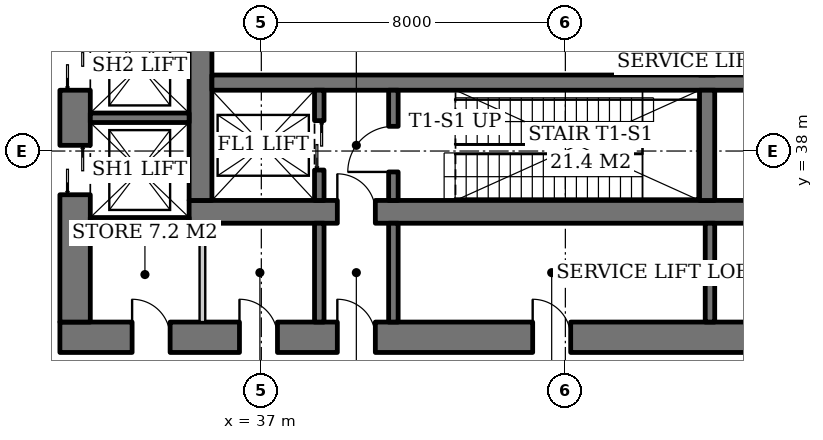
"""IFC4 building model, lengths in metres.
Left out: names, types, materials, properties, quantities, classifications, styles, units other than length and angle.
Written with IfcOpenShell. Run it as: python <this file> out.ifc"""

import sys

from ifc_helpers import new_model, si_unit, direction, frame, frame_2d, origin, place, context, subcontext, project, spatial, rectangle, extrude, element, fill, save


model = new_model("IFC4")
c1 = context("Model", 3, precision=1e-05, world=origin(), true_north=direction((0.0, 1.0)))
c2 = subcontext(c1, "Body", "Model", "MODEL_VIEW")
j1 = project(units=[si_unit("LENGTHUNIT", "METRE"), si_unit("PLANEANGLEUNIT", "RADIAN")], contexts=[c1])
p1 = place(None, origin())
s1 = spatial("IfcSite", under=j1, at=p1, CompositionType="ELEMENT")
p2 = place(p1, origin())
s2 = spatial("IfcBuilding", under=s1, at=p2, CompositionType="ELEMENT")
p3 = place(p2, origin())
s3 = spatial("IfcBuildingStorey", under=s2, at=p3, CompositionType="ELEMENT", Elevation=0.0)
p4 = place(p3, frame((35.1, 36.4, 0.0), z_axis=(0.0, 0.0, 1.0), x_axis=(1.0, 0.0, 0.0)))
e1 = element("IfcWall", 1, at=p4, inside=s3, PredefinedType="SHEAR", context=c2, shape_type="SweptSolid", body=[
    extrude(rectangle(XDim=19.8, YDim=0.6, at=frame_2d((9.9, 0.0))), origin(), (0.0, 0.0, 1.0), 6.0),
])
p5 = place(p4, frame((3.9, 0.0, 0.0)))
e2 = element("IfcOpeningElement", 2, at=p5, cuts=e1, PredefinedType="OPENING", context=c2, shape_type="SweptSolid", body=[
    extrude(rectangle(XDim=1.0, YDim=2.1, at=frame_2d((0.5, 1.05))), frame((0.0, 0.31, 0.0), z_axis=(0.0, -1.0, 0.0), x_axis=(1.0, 0.0, 0.0)), (0.0, 0.0, 1.0), 0.62),
])
p6 = place(p4, frame((15.35, 0.0, 0.0)))
e3 = element("IfcOpeningElement", 3, at=p6, cuts=e1, PredefinedType="OPENING", context=c2, shape_type="SweptSolid", body=[
    extrude(rectangle(XDim=1.0, YDim=2.1, at=frame_2d((0.5, 1.05))), frame((0.0, 0.31, 0.0), z_axis=(0.0, -1.0, 0.0), x_axis=(1.0, 0.0, 0.0)), (0.0, 0.0, 1.0), 0.62),
])
p7 = place(p3, frame((35.4, 36.7, 0.0), z_axis=(0.0, 0.0, 1.0), x_axis=(0.0, 1.0, 0.0)))
e4 = element("IfcWall", 4, at=p7, inside=s3, PredefinedType="SHEAR", context=c2, shape_type="SweptSolid", body=[
    extrude(rectangle(XDim=18.6, YDim=0.6, at=frame_2d((9.3, 0.0))), origin(), (0.0, 0.0, 1.0), 6.0),
])
p8 = place(p7, frame((8.4, 0.0, 0.0)))
e5 = element("IfcOpeningElement", 5, at=p8, cuts=e4, PredefinedType="OPENING", context=c2, shape_type="SweptSolid", body=[
    extrude(rectangle(XDim=1.8, YDim=2.4, at=frame_2d((0.9, 1.2))), frame((0.0, 0.31, 0.0), z_axis=(0.0, -1.0, 0.0), x_axis=(1.0, 0.0, 0.0)), (0.0, 0.0, 1.0), 0.62),
])
p9 = place(p3, frame((31.7, 33.1, 0.0), z_axis=(0.0, 0.0, 1.0), x_axis=(1.0, 0.0, 0.0)))
e6 = element("IfcWall", 6, at=p9, inside=s3, PredefinedType="SHEAR", context=c2, shape_type="SweptSolid", body=[
    extrude(rectangle(XDim=26.6, YDim=0.8, at=frame_2d((13.3, 0.0))), origin(), (0.0, 0.0, 1.0), 6.0),
])
p10 = place(p9, frame((7.3, 0.0, 0.0)))
e7 = element("IfcOpeningElement", 7, at=p10, cuts=e6, PredefinedType="OPENING", context=c2, shape_type="SweptSolid", body=[
    extrude(rectangle(XDim=1.0, YDim=2.1, at=frame_2d((0.5, 1.05))), frame((0.0, 0.41, 0.0), z_axis=(0.0, -1.0, 0.0), x_axis=(1.0, 0.0, 0.0)), (0.0, 0.0, 1.0), 0.82),
])
p11 = place(p9, frame((18.75, 0.0, 0.0)))
e8 = element("IfcOpeningElement", 8, at=p11, cuts=e6, PredefinedType="OPENING", context=c2, shape_type="SweptSolid", body=[
    extrude(rectangle(XDim=1.0, YDim=2.1, at=frame_2d((0.5, 1.05))), frame((0.0, 0.41, 0.0), z_axis=(0.0, -1.0, 0.0), x_axis=(1.0, 0.0, 0.0)), (0.0, 0.0, 1.0), 0.82),
])
p12 = place(p9, frame((1.9, 0.0, 0.0)))
e9 = element("IfcOpeningElement", 9, at=p12, cuts=e6, PredefinedType="OPENING", context=c2, shape_type="SweptSolid", body=[
    extrude(rectangle(XDim=1.0, YDim=2.1, at=frame_2d((0.5, 1.05))), frame((0.0, 0.41, 0.0), z_axis=(0.0, -1.0, 0.0), x_axis=(1.0, 0.0, 0.0)), (0.0, 0.0, 1.0), 0.82),
])
p13 = place(p9, frame((4.725, 0.0, 0.0)))
e10 = element("IfcOpeningElement", 10, at=p13, cuts=e6, PredefinedType="OPENING", context=c2, shape_type="SweptSolid", body=[
    extrude(rectangle(XDim=1.0, YDim=2.1, at=frame_2d((0.5, 1.05))), frame((0.0, 0.41, 0.0), z_axis=(0.0, -1.0, 0.0), x_axis=(1.0, 0.0, 0.0)), (0.0, 0.0, 1.0), 0.82),
])
p14 = place(p9, frame((12.44, 0.0, 0.0)))
e11 = element("IfcOpeningElement", 11, at=p14, cuts=e6, PredefinedType="OPENING", context=c2, shape_type="SweptSolid", body=[
    extrude(rectangle(XDim=1.0, YDim=2.1, at=frame_2d((0.5, 1.05))), frame((0.0, 0.41, 0.0), z_axis=(0.0, -1.0, 0.0), x_axis=(1.0, 0.0, 0.0)), (0.0, 0.0, 1.0), 0.82),
])
p15 = place(p9, frame((20.626, 0.0, 0.0)))
e12 = element("IfcOpeningElement", 12, at=p15, cuts=e6, PredefinedType="OPENING", context=c2, shape_type="SweptSolid", body=[
    extrude(rectangle(XDim=1.0, YDim=2.1, at=frame_2d((0.5, 1.05))), frame((0.0, 0.41, 0.0), z_axis=(0.0, -1.0, 0.0), x_axis=(1.0, 0.0, 0.0)), (0.0, 0.0, 1.0), 0.82),
])
p16 = place(p9, frame((23.476, 0.0, 0.0)))
e13 = element("IfcOpeningElement", 13, at=p16, cuts=e6, PredefinedType="OPENING", context=c2, shape_type="SweptSolid", body=[
    extrude(rectangle(XDim=1.0, YDim=2.1, at=frame_2d((0.5, 1.05))), frame((0.0, 0.41, 0.0), z_axis=(0.0, -1.0, 0.0), x_axis=(1.0, 0.0, 0.0)), (0.0, 0.0, 1.0), 0.82),
])
p17 = place(p3, frame((32.1, 33.5, 0.0), z_axis=(0.0, 0.0, 1.0), x_axis=(0.0, 1.0, 0.0)))
e14 = element("IfcWall", 14, at=p17, inside=s3, PredefinedType="SHEAR", context=c2, shape_type="SweptSolid", body=[
    extrude(rectangle(XDim=25.0, YDim=0.8, at=frame_2d((12.5, 0.0))), origin(), (0.0, 0.0, 1.0), 6.0),
])
p18 = place(p17, frame((3.35, 0.0, 0.0)))
e15 = element("IfcOpeningElement", 15, at=p18, cuts=e14, PredefinedType="OPENING", context=c2, shape_type="SweptSolid", body=[
    extrude(rectangle(XDim=1.3, YDim=2.2, at=frame_2d((0.65, 1.1))), frame((0.0, 0.41, 0.0), z_axis=(0.0, -1.0, 0.0), x_axis=(1.0, 0.0, 0.0)), (0.0, 0.0, 1.0), 0.82),
])
p19 = place(p17, frame((6.1, 0.0, 0.0)))
e16 = element("IfcOpeningElement", 16, at=p19, cuts=e14, PredefinedType="OPENING", context=c2, shape_type="SweptSolid", body=[
    extrude(rectangle(XDim=1.3, YDim=2.2, at=frame_2d((0.65, 1.1))), frame((0.0, 0.41, 0.0), z_axis=(0.0, -1.0, 0.0), x_axis=(1.0, 0.0, 0.0)), (0.0, 0.0, 1.0), 0.82),
])
p20 = place(p17, frame((8.85, 0.0, 0.0)))
e17 = element("IfcOpeningElement", 17, at=p20, cuts=e14, PredefinedType="OPENING", context=c2, shape_type="SweptSolid", body=[
    extrude(rectangle(XDim=1.3, YDim=2.2, at=frame_2d((0.65, 1.1))), frame((0.0, 0.41, 0.0), z_axis=(0.0, -1.0, 0.0), x_axis=(1.0, 0.0, 0.0)), (0.0, 0.0, 1.0), 0.82),
])
p21 = place(p17, frame((14.85, 0.0, 0.0)))
e18 = element("IfcOpeningElement", 18, at=p21, cuts=e14, PredefinedType="OPENING", context=c2, shape_type="SweptSolid", body=[
    extrude(rectangle(XDim=1.3, YDim=2.2, at=frame_2d((0.65, 1.1))), frame((0.0, 0.41, 0.0), z_axis=(0.0, -1.0, 0.0), x_axis=(1.0, 0.0, 0.0)), (0.0, 0.0, 1.0), 0.82),
])
p22 = place(p17, frame((17.6, 0.0, 0.0)))
e19 = element("IfcOpeningElement", 19, at=p22, cuts=e14, PredefinedType="OPENING", context=c2, shape_type="SweptSolid", body=[
    extrude(rectangle(XDim=1.3, YDim=2.2, at=frame_2d((0.65, 1.1))), frame((0.0, 0.41, 0.0), z_axis=(0.0, -1.0, 0.0), x_axis=(1.0, 0.0, 0.0)), (0.0, 0.0, 1.0), 0.82),
])
p23 = place(p17, frame((11.6, 0.0, 0.0)))
e20 = element("IfcOpeningElement", 20, at=p23, cuts=e14, PredefinedType="OPENING", context=c2, shape_type="SweptSolid", body=[
    extrude(rectangle(XDim=1.8, YDim=2.4, at=frame_2d((0.9, 1.2))), frame((0.0, 0.41, 0.0), z_axis=(0.0, -1.0, 0.0), x_axis=(1.0, 0.0, 0.0)), (0.0, 0.0, 1.0), 0.82),
])
p24 = place(p3, frame((35.7, 39.8, 0.0), z_axis=(0.0, 0.0, 1.0), x_axis=(1.0, 0.0, 0.0)))
e21 = element("IfcWall", 21, at=p24, inside=s3, PredefinedType="SHEAR", context=c2, shape_type="SweptSolid", body=[
    extrude(rectangle(XDim=18.6, YDim=0.4, at=frame_2d((9.3, 0.0))), origin(), (0.0, 0.0, 1.0), 6.0),
])
p25 = place(p3, frame((48.73, 36.7, 0.0), z_axis=(0.0, 0.0, 1.0), x_axis=(0.0, 1.0, 0.0)))
e22 = element("IfcWall", 22, at=p25, inside=s3, PredefinedType="SHEAR", context=c2, shape_type="SweptSolid", body=[
    extrude(rectangle(XDim=2.9, YDim=0.4, at=frame_2d((1.45, 0.0))), origin(), (0.0, 0.0, 1.0), 6.0),
])
p26 = place(p3, frame((48.73, 40.0, 0.0), z_axis=(0.0, 0.0, 1.0), x_axis=(0.0, 1.0, 0.0)))
e23 = element("IfcWall", 23, at=p26, inside=s3, PredefinedType="SHEAR", context=c2, shape_type="SweptSolid", body=[
    extrude(rectangle(XDim=12.0, YDim=0.4, at=frame_2d((6.0, 0.0))), origin(), (0.0, 0.0, 1.0), 6.0),
])
p27 = place(p3, frame((38.525, 36.7, 0.0), z_axis=(0.0, 0.0, 1.0), x_axis=(0.0, 1.0, 0.0)))
e24 = element("IfcWall", 24, at=p27, inside=s3, PredefinedType="SHEAR", context=c2, shape_type="SweptSolid", body=[
    extrude(rectangle(XDim=2.9, YDim=0.25, at=frame_2d((1.45, 0.0))), origin(), (0.0, 0.0, 1.0), 6.0),
])
p28 = place(p27, frame((0.8, 0.0, 0.0)))
e25 = element("IfcOpeningElement", 25, at=p28, cuts=e24, PredefinedType="OPENING", context=c2, shape_type="SweptSolid", body=[
    extrude(rectangle(XDim=1.3, YDim=2.2, at=frame_2d((0.65, 1.1))), frame((0.0, 0.135, 0.0), z_axis=(0.0, -1.0, 0.0), x_axis=(1.0, 0.0, 0.0)), (0.0, 0.0, 1.0), 0.27),
])
p29 = place(p3, frame((40.475, 36.7, 0.0), z_axis=(0.0, 0.0, 1.0), x_axis=(0.0, 1.0, 0.0)))
e26 = element("IfcWall", 26, at=p29, inside=s3, PredefinedType="SHEAR", context=c2, shape_type="SweptSolid", body=[
    extrude(rectangle(XDim=2.9, YDim=0.25, at=frame_2d((1.45, 0.0))), origin(), (0.0, 0.0, 1.0), 6.0),
])
p30 = place(p29, frame((0.75, 0.0, 0.0)))
e27 = element("IfcOpeningElement", 27, at=p30, cuts=e26, PredefinedType="OPENING", context=c2, shape_type="SweptSolid", body=[
    extrude(rectangle(XDim=1.2, YDim=2.1, at=frame_2d((0.6, 1.05))), frame((0.0, 0.135, 0.0), z_axis=(0.0, -1.0, 0.0), x_axis=(1.0, 0.0, 0.0)), (0.0, 0.0, 1.0), 0.27),
])
for number, where, z_axis, x_axis in (
    (28, (32.5, 36.125, 0.0), (0.0, 0.0, 1.0), (1.0, 0.0, 0.0)),
    (29, (32.5, 38.875, 0.0), (0.0, 0.0, 1.0), (1.0, 0.0, 0.0)),
):
    element("IfcWall", number, at=place(p3, frame(where, z_axis=z_axis, x_axis=x_axis)), inside=s3, PredefinedType="SHEAR", context=c2, shape_type="SweptSolid", body=[
        extrude(rectangle(XDim=2.6, YDim=0.25, at=frame_2d((1.3, 0.0))), origin(), (0.0, 0.0, 1.0), 6.0),
    ])
for number, where, z_axis, x_axis in (
    (30, (38.525, 33.5, 0.0), (0.0, 0.0, 1.0), (0.0, 1.0, 0.0)),
    (31, (40.475, 33.5, 0.0), (0.0, 0.0, 1.0), (0.0, 1.0, 0.0)),
    (32, (48.805, 33.5, 0.0), (0.0, 0.0, 1.0), (0.0, 1.0, 0.0)),
):
    element("IfcWall", number, at=place(p3, frame(where, z_axis=z_axis, x_axis=x_axis)), inside=s3, PredefinedType="SOLIDWALL", context=c2, shape_type="SweptSolid", body=[
        extrude(rectangle(XDim=2.6, YDim=0.25, at=frame_2d((1.3, 0.0))), origin(), (0.0, 0.0, 1.0), 5.7),
    ])
p31 = place(p3, frame((35.45, 33.5, 0.0), z_axis=(0.0, 0.0, 1.0), x_axis=(0.0, 1.0, 0.0)))
e33 = element("IfcWall", 33, at=p31, inside=s3, PredefinedType="SOLIDWALL", context=c2, shape_type="SweptSolid", body=[
    extrude(rectangle(XDim=2.6, YDim=0.15, at=frame_2d((1.3, 0.0))), origin(), (0.0, 0.0, 1.0), 5.7),
])
p32 = place(p28, origin())
e34 = element("IfcDoor", 34, at=p32, inside=s3, OperationType="DOUBLE_DOOR_SLIDING", PredefinedType="DOOR", context=c2, shape_type="SweptSolid", body=[
    extrude(rectangle(XDim=1.3, YDim=2.2, at=frame_2d((0.65, 1.1))), frame((0.0, 0.025, 0.0), z_axis=(0.0, -1.0, 0.0), x_axis=(1.0, 0.0, 0.0)), (0.0, 0.0, 1.0), 0.05),
])
fill(e25, e34)
p33 = place(p30, origin())
e35 = element("IfcDoor", 35, at=p33, inside=s3, OperationType="SINGLE_SWING_LEFT", PredefinedType="DOOR", context=c2, shape_type="SweptSolid", body=[
    extrude(rectangle(XDim=1.2, YDim=2.1, at=frame_2d((0.6, 1.05))), frame((0.0, 0.025, 0.0), z_axis=(0.0, -1.0, 0.0), x_axis=(1.0, 0.0, 0.0)), (0.0, 0.0, 1.0), 0.05),
])
fill(e27, e35)
p34 = place(p5, origin())
e36 = element("IfcDoor", 36, at=p34, inside=s3, OperationType="SINGLE_SWING_LEFT", PredefinedType="DOOR", context=c2, shape_type="SweptSolid", body=[
    extrude(rectangle(XDim=1.0, YDim=2.1, at=frame_2d((0.5, 1.05))), frame((0.0, 0.025, 0.0), z_axis=(0.0, -1.0, 0.0), x_axis=(1.0, 0.0, 0.0)), (0.0, 0.0, 1.0), 0.05),
])
fill(e2, e36)
p35 = place(p18, origin())
e37 = element("IfcDoor", 37, at=p35, inside=s3, OperationType="DOUBLE_DOOR_SLIDING", PredefinedType="DOOR", context=c2, shape_type="SweptSolid", body=[
    extrude(rectangle(XDim=1.3, YDim=2.2, at=frame_2d((0.65, 1.1))), frame((0.0, 0.025, 0.0), z_axis=(0.0, -1.0, 0.0), x_axis=(1.0, 0.0, 0.0)), (0.0, 0.0, 1.0), 0.05),
])
fill(e15, e37)
p36 = place(p19, origin())
e38 = element("IfcDoor", 38, at=p36, inside=s3, OperationType="DOUBLE_DOOR_SLIDING", PredefinedType="DOOR", context=c2, shape_type="SweptSolid", body=[
    extrude(rectangle(XDim=1.3, YDim=2.2, at=frame_2d((0.65, 1.1))), frame((0.0, 0.025, 0.0), z_axis=(0.0, -1.0, 0.0), x_axis=(1.0, 0.0, 0.0)), (0.0, 0.0, 1.0), 0.05),
])
fill(e16, e38)
p37 = place(p10, origin())
e39 = element("IfcDoor", 39, at=p37, inside=s3, OperationType="SINGLE_SWING_LEFT", PredefinedType="DOOR", context=c2, shape_type="SweptSolid", body=[
    extrude(rectangle(XDim=1.0, YDim=2.1, at=frame_2d((0.5, 1.05))), frame((0.0, 0.025, 0.0), z_axis=(0.0, -1.0, 0.0), x_axis=(1.0, 0.0, 0.0)), (0.0, 0.0, 1.0), 0.05),
])
fill(e7, e39)
p38 = place(p12, origin())
e40 = element("IfcDoor", 40, at=p38, inside=s3, OperationType="SINGLE_SWING_LEFT", PredefinedType="DOOR", context=c2, shape_type="SweptSolid", body=[
    extrude(rectangle(XDim=1.0, YDim=2.1, at=frame_2d((0.5, 1.05))), frame((0.0, 0.39, 0.0), z_axis=(0.0, -1.0, 0.0), x_axis=(1.0, 0.0, 0.0)), (0.0, 0.0, 1.0), 0.05),
])
fill(e9, e40)
p39 = place(p13, origin())
e41 = element("IfcDoor", 41, at=p39, inside=s3, OperationType="SINGLE_SWING_LEFT", PredefinedType="DOOR", context=c2, shape_type="SweptSolid", body=[
    extrude(rectangle(XDim=1.0, YDim=2.1, at=frame_2d((0.5, 1.05))), frame((0.0, 0.39, 0.0), z_axis=(0.0, -1.0, 0.0), x_axis=(1.0, 0.0, 0.0)), (0.0, 0.0, 1.0), 0.05),
])
fill(e10, e41)
p40 = place(p14, origin())
e42 = element("IfcDoor", 42, at=p40, inside=s3, OperationType="SINGLE_SWING_LEFT", PredefinedType="DOOR", context=c2, shape_type="SweptSolid", body=[
    extrude(rectangle(XDim=1.0, YDim=2.1, at=frame_2d((0.5, 1.05))), frame((0.0, 0.39, 0.0), z_axis=(0.0, -1.0, 0.0), x_axis=(1.0, 0.0, 0.0)), (0.0, 0.0, 1.0), 0.05),
])
fill(e11, e42)
save(model, sys.argv[1])
